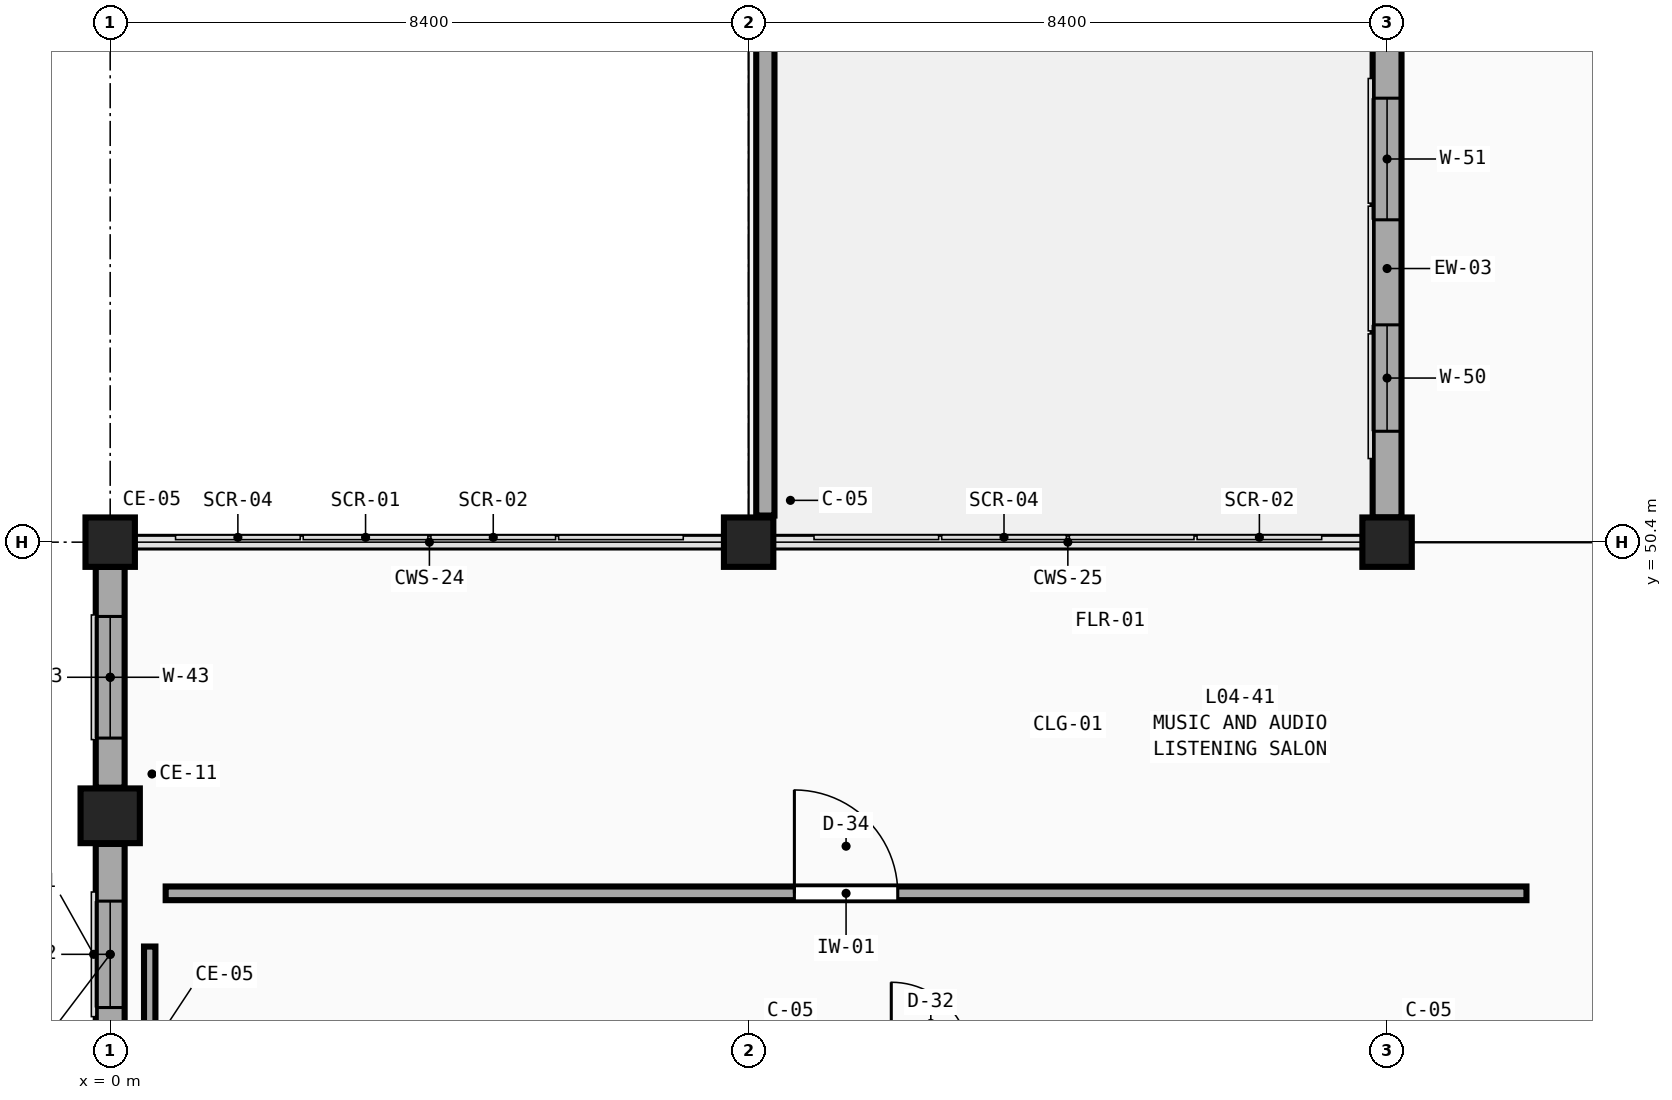
"""IFC4 building model, lengths in metres.
Left out: names, types, materials, properties, quantities, classifications, styles, units other than length and angle.
Written with IfcOpenShell. Run it as: python <this file> out.ifc"""

import sys

from ifc_helpers import new_model, si_unit, direction, frame, frame_2d, origin, origin_2d, place, context, subcontext, project, spatial, rectangle, extrude, element, fill, save


model = new_model("IFC4")
c1 = context("Model", 3, precision=1e-05, world=origin(), true_north=direction((0.0, 1.0)))
c2 = subcontext(c1, "Body", "Model", "MODEL_VIEW")
j1 = project(units=[si_unit("LENGTHUNIT", "METRE"), si_unit("PLANEANGLEUNIT", "RADIAN")], contexts=[c1])
p1 = place(None, origin())
s1 = spatial("IfcSite", under=j1, at=p1, CompositionType="ELEMENT")
p2 = place(p1, origin())
s2 = spatial("IfcBuilding", under=s1, at=p2, CompositionType="ELEMENT")
p3 = place(p2, frame((0.0, 0.0, 18.9)))
s3 = spatial("IfcBuildingStorey", under=s2, at=p3, CompositionType="ELEMENT", Elevation=18.9)
for number, where, z_axis, x_axis in (
    (1, (0.0, 50.4, 0.0), (0.0, 0.0, 1.0), (1.0, 0.0, 0.0)),
    (2, (8.4, 50.4, 0.0), (0.0, 0.0, 1.0), (1.0, 0.0, 0.0)),
    (3, (16.8, 50.4, 0.0), (0.0, 0.0, 1.0), (1.0, 0.0, 0.0)),
):
    element("IfcColumn", number, at=place(p3, frame(where, z_axis=z_axis, x_axis=x_axis)), inside=s3, PredefinedType="COLUMN", context=c2, shape_type="SweptSolid", body=[
        extrude(rectangle(XDim=0.65, YDim=0.65, at=origin_2d()), origin(), (0.0, 0.0, 1.0), 4.5),
    ])
p4 = place(p3, frame((0.0, 46.8, 0.0), z_axis=(0.0, 0.0, 1.0), x_axis=(1.0, 0.0, 0.0)))
e4 = element("IfcColumn", 4, at=p4, inside=s3, PredefinedType="PILASTER", context=c2, shape_type="SweptSolid", body=[
    extrude(rectangle(XDim=0.78, YDim=0.72, at=origin_2d()), origin(), (0.0, 0.0, 1.0), 4.5),
])
p5 = place(p3, frame((0.0, 43.525, 0.0), z_axis=(0.0, 0.0, 1.0), x_axis=(0.0, 1.0, 0.0)))
e5 = element("IfcWall", 5, at=p5, inside=s3, PredefinedType="SOLIDWALL", context=c2, shape_type="SweptSolid", body=[
    extrude(rectangle(XDim=2.905, YDim=0.38, at=frame_2d((1.453, 0.0))), origin(), (0.0, 0.0, 1.0), 3.63),
])
p6 = place(p5, frame((0.752, 0.0, 0.75)))
e6 = element("IfcOpeningElement", 6, at=p6, cuts=e5, PredefinedType="OPENING", context=c2, shape_type="SweptSolid", body=[
    extrude(rectangle(XDim=1.4, YDim=2.73, at=frame_2d((0.7, 1.365))), frame((0.0, 0.21, 0.0), z_axis=(0.0, -1.0, 0.0), x_axis=(1.0, 0.0, 0.0)), (0.0, 0.0, 1.0), 0.42),
])
p7 = place(p3, frame((0.0, 47.17, 0.0), z_axis=(0.0, 0.0, 1.0), x_axis=(0.0, 1.0, 0.0)))
e7 = element("IfcWall", 7, at=p7, inside=s3, PredefinedType="SOLIDWALL", context=c2, shape_type="SweptSolid", body=[
    extrude(rectangle(XDim=2.905, YDim=0.38, at=frame_2d((1.453, 0.0))), origin(), (0.0, 0.0, 1.0), 3.63),
])
p8 = place(p7, frame((0.653, 0.0, 0.75)))
e8 = element("IfcOpeningElement", 8, at=p8, cuts=e7, PredefinedType="OPENING", context=c2, shape_type="SweptSolid", body=[
    extrude(rectangle(XDim=1.6, YDim=2.73, at=frame_2d((0.8, 1.365))), frame((0.0, 0.21, 0.0), z_axis=(0.0, -1.0, 0.0), x_axis=(1.0, 0.0, 0.0)), (0.0, 0.0, 1.0), 0.42),
])
p9 = place(p3, frame((16.8, 50.725, 0.0), z_axis=(0.0, 0.0, 1.0), x_axis=(0.0, 1.0, 0.0)))
e9 = element("IfcWall", 9, at=p9, inside=s3, PredefinedType="SOLIDWALL", context=c2, shape_type="SweptSolid", body=[
    extrude(rectangle(XDim=6.55, YDim=0.38, at=frame_2d((3.275, 0.0))), origin(), (0.0, 0.0, 1.0), 3.63),
])
p10 = place(p9, frame((1.134, 0.0, 0.75)))
e10 = element("IfcOpeningElement", 10, at=p10, cuts=e9, PredefinedType="OPENING", context=c2, shape_type="SweptSolid", body=[
    extrude(rectangle(XDim=1.4, YDim=2.73, at=frame_2d((0.7, 1.365))), frame((0.0, 0.21, 0.0), z_axis=(0.0, -1.0, 0.0), x_axis=(1.0, 0.0, 0.0)), (0.0, 0.0, 1.0), 0.42),
])
p11 = place(p9, frame((3.916, 0.0, 0.75)))
e11 = element("IfcOpeningElement", 11, at=p11, cuts=e9, PredefinedType="OPENING", context=c2, shape_type="SweptSolid", body=[
    extrude(rectangle(XDim=1.6, YDim=2.73, at=frame_2d((0.8, 1.365))), frame((0.0, 0.21, 0.0), z_axis=(0.0, -1.0, 0.0), x_axis=(1.0, 0.0, 0.0)), (0.0, 0.0, 1.0), 0.42),
])
p12 = place(p3, frame((8.62, 50.75, 0.0), z_axis=(0.0, 0.0, 1.0), x_axis=(0.0, 1.0, 0.0)))
e12 = element("IfcWall", 12, at=p12, inside=s3, PredefinedType="PARAPET", context=c2, shape_type="SweptSolid", body=[
    extrude(rectangle(XDim=28.1, YDim=0.24, at=frame_2d((14.05, 0.0))), origin(), (0.0, 0.0, 1.0), 1.15),
])
p13 = place(p3, frame((0.73, 45.78, 0.0), z_axis=(0.0, 0.0, 1.0), x_axis=(1.0, 0.0, 0.0)))
e13 = element("IfcWall", 13, at=p13, inside=s3, PredefinedType="PARTITIONING", context=c2, shape_type="SweptSolid", body=[
    extrude(rectangle(XDim=17.904, YDim=0.18, at=frame_2d((8.952, 0.0))), origin(), (0.0, 0.0, 1.0), 4.18),
])
p14 = place(p13, frame((8.272, 0.0, 0.0)))
e14 = element("IfcOpeningElement", 14, at=p14, cuts=e13, PredefinedType="OPENING", context=c2, shape_type="SweptSolid", body=[
    extrude(rectangle(XDim=1.36, YDim=2.45, at=frame_2d((0.68, 1.225))), frame((0.0, 0.11, 0.0), z_axis=(0.0, -1.0, 0.0), x_axis=(1.0, 0.0, 0.0)), (0.0, 0.0, 1.0), 0.22),
])
p15 = place(p3, frame((0.52, 43.78, 0.0), z_axis=(0.0, 0.0, 1.0), x_axis=(0.0, 1.0, 0.0)))
e15 = element("IfcWall", 15, at=p15, inside=s3, PredefinedType="PARTITIONING", context=c2, shape_type="SweptSolid", body=[
    extrude(rectangle(XDim=1.3, YDim=0.15, at=frame_2d((0.65, 0.0))), origin(), (0.0, 0.0, 1.0), 3.63),
])
p16 = place(p6, origin())
e16 = element("IfcWindow", 16, at=p16, inside=s3, PartitioningType="DOUBLE_PANEL_VERTICAL", PredefinedType="WINDOW", context=c2, shape_type="SweptSolid", body=[
    extrude(rectangle(XDim=1.4, YDim=2.73, at=frame_2d((0.7, 1.365))), frame((0.0, 0.03, 0.0), z_axis=(0.0, -1.0, 0.0), x_axis=(1.0, 0.0, 0.0)), (0.0, 0.0, 1.0), 0.06),
])
fill(e6, e16)
p17 = place(p8, origin())
e17 = element("IfcWindow", 17, at=p17, inside=s3, PartitioningType="DOUBLE_PANEL_VERTICAL", PredefinedType="WINDOW", context=c2, shape_type="SweptSolid", body=[
    extrude(rectangle(XDim=1.6, YDim=2.73, at=frame_2d((0.8, 1.365))), frame((0.0, 0.03, 0.0), z_axis=(0.0, -1.0, 0.0), x_axis=(1.0, 0.0, 0.0)), (0.0, 0.0, 1.0), 0.06),
])
fill(e8, e17)
p18 = place(p10, origin())
e18 = element("IfcWindow", 18, at=p18, inside=s3, PartitioningType="DOUBLE_PANEL_VERTICAL", PredefinedType="WINDOW", context=c2, shape_type="SweptSolid", body=[
    extrude(rectangle(XDim=1.4, YDim=2.73, at=frame_2d((0.7, 1.365))), frame((0.0, 0.03, 0.0), z_axis=(0.0, -1.0, 0.0), x_axis=(1.0, 0.0, 0.0)), (0.0, 0.0, 1.0), 0.06),
])
fill(e10, e18)
p19 = place(p11, origin())
e19 = element("IfcWindow", 19, at=p19, inside=s3, PartitioningType="DOUBLE_PANEL_VERTICAL", PredefinedType="WINDOW", context=c2, shape_type="SweptSolid", body=[
    extrude(rectangle(XDim=1.6, YDim=2.73, at=frame_2d((0.8, 1.365))), frame((0.0, 0.03, 0.0), z_axis=(0.0, -1.0, 0.0), x_axis=(1.0, 0.0, 0.0)), (0.0, 0.0, 1.0), 0.06),
])
fill(e11, e19)
p20 = place(p14, origin())
e20 = element("IfcDoor", 20, at=p20, inside=s3, OperationType="SINGLE_SWING_LEFT", PredefinedType="DOOR", context=c2, shape_type="SweptSolid", body=[
    extrude(rectangle(XDim=1.36, YDim=2.45, at=frame_2d((0.68, 1.225))), frame((0.0, 0.025, 0.0), z_axis=(0.0, -1.0, 0.0), x_axis=(1.0, 0.0, 0.0)), (0.0, 0.0, 1.0), 0.05),
])
fill(e14, e20)
save(model, sys.argv[1])
